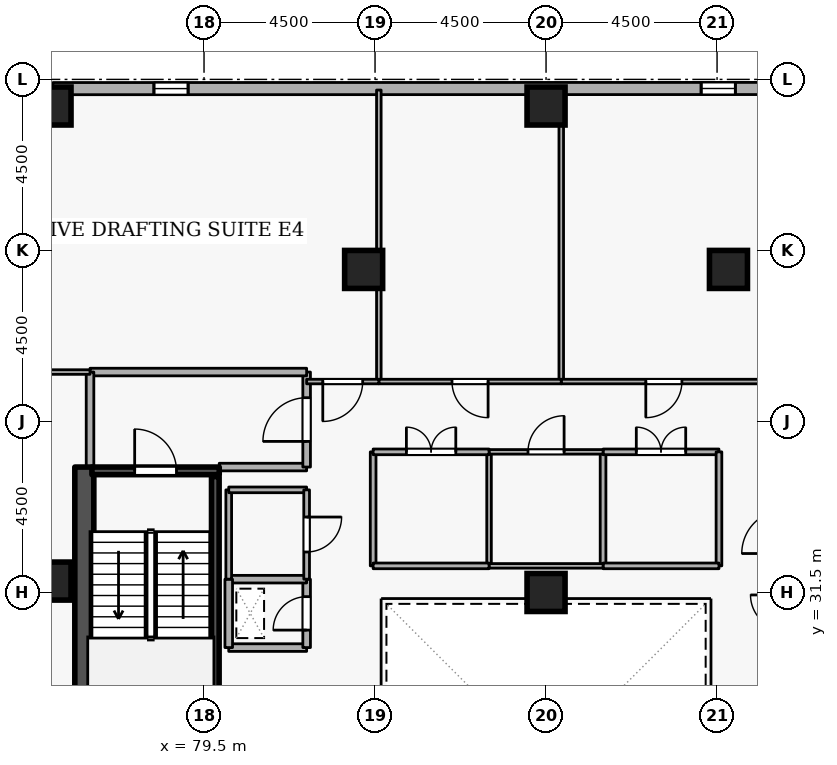
"""IFC4 building model, lengths in metres.
Left out: names, types, materials, properties, quantities, classifications, styles, units other than length and angle.
Written with IfcOpenShell. Run it as: python <this file> out.ifc"""

import sys

from ifc_helpers import new_model, si_unit, direction, frame, frame_2d, origin, origin_2d, place, context, subcontext, project, spatial, rectangle, extrude, element, fill, save


model = new_model("IFC4")
c1 = context("Model", 3, precision=1e-05, world=origin(), true_north=direction((0.0, 1.0)))
c2 = subcontext(c1, "Body", "Model", "MODEL_VIEW")
j1 = project(units=[si_unit("LENGTHUNIT", "METRE"), si_unit("PLANEANGLEUNIT", "RADIAN")], contexts=[c1])
p1 = place(None, origin())
s1 = spatial("IfcSite", under=j1, at=p1, CompositionType="ELEMENT")
p2 = place(p1, origin())
s2 = spatial("IfcBuilding", under=s1, at=p2, CompositionType="ELEMENT")
p3 = place(p2, frame((0.0, 0.0, 247.5)))
s3 = spatial("IfcBuildingStorey", under=s2, at=p3, CompositionType="ELEMENT", Elevation=247.5)
p4 = place(p3, frame((76.35, 19.2, 0.0), z_axis=(0.0, 0.0, 1.0), x_axis=(0.0, 1.0, 0.0)))
e1 = element("IfcWall", 1, at=p4, inside=s3, PredefinedType="SHEAR", context=c2, shape_type="SweptSolid", body=[
    extrude(rectangle(XDim=15.6, YDim=0.5, at=frame_2d((7.8, 0.0))), origin(), (0.0, 0.0, 1.0), 3.6),
])
for number, where, z_axis, x_axis in (
    (2, (88.5, 44.3, 0.0), (0.0, 0.0, 1.0), (1.0, 0.0, 0.0)),
    (3, (75.5, 44.3, 0.0), (0.0, 0.0, 1.0), (1.0, 0.0, 0.0)),
    (4, (93.3, 40.0, 0.0), (0.0, 0.0, 1.0), (1.0, 0.0, 0.0)),
    (5, (83.7, 40.0, 0.0), (0.0, 0.0, 1.0), (1.0, 0.0, 0.0)),
    (6, (75.5, 31.8, 0.0), (0.0, 0.0, 1.0), (1.0, 0.0, 0.0)),
    (7, (88.5, 31.5, 0.0), (0.0, 0.0, 1.0), (1.0, 0.0, 0.0)),
):
    element("IfcColumn", number, at=place(p3, frame(where, z_axis=z_axis, x_axis=x_axis)), inside=s3, PredefinedType="COLUMN", context=c2, shape_type="SweptSolid", body=[
        extrude(rectangle(XDim=1.0, YDim=1.0, at=origin_2d()), origin(), (0.0, 0.0, 1.0), 3.6),
    ])
p5 = place(p3, frame((109.681, 44.765, 0.0), z_axis=(0.0, 0.0, 1.0), x_axis=(-0.99999997701, -0.000214431216, 0.0)))
e8 = element("IfcWall", 8, at=p5, inside=s3, PredefinedType="STANDARD", context=c2, shape_type="SweptSolid", body=[
    extrude(rectangle(XDim=34.156, YDim=0.32, at=frame_2d((17.078, 0.0))), origin(), (0.0, 0.0, 1.0), 2.7),
])
p6 = place(p5, frame((1.8, 0.0, 0.72)))
e9 = element("IfcOpeningElement", 9, at=p6, cuts=e8, PredefinedType="OPENING", context=c2, shape_type="SweptSolid", body=[
    extrude(rectangle(XDim=0.9, YDim=1.75, at=frame_2d((0.45, 0.875))), frame((0.0, 0.17, 0.0), z_axis=(0.0, -1.0, 0.0), x_axis=(1.0, 0.0, 0.0)), (0.0, 0.0, 1.0), 0.34),
])
p7 = place(p5, frame((11.4, 0.0, 0.72)))
e10 = element("IfcOpeningElement", 10, at=p7, cuts=e8, PredefinedType="OPENING", context=c2, shape_type="SweptSolid", body=[
    extrude(rectangle(XDim=0.9, YDim=1.75, at=frame_2d((0.45, 0.875))), frame((0.0, 0.17, 0.0), z_axis=(0.0, -1.0, 0.0), x_axis=(1.0, 0.0, 0.0)), (0.0, 0.0, 1.0), 0.34),
])
p8 = place(p5, frame((16.2, 0.0, 0.72)))
e11 = element("IfcOpeningElement", 11, at=p8, cuts=e8, PredefinedType="OPENING", context=c2, shape_type="SweptSolid", body=[
    extrude(rectangle(XDim=0.9, YDim=1.75, at=frame_2d((0.45, 0.875))), frame((0.0, 0.17, 0.0), z_axis=(0.0, -1.0, 0.0), x_axis=(1.0, 0.0, 0.0)), (0.0, 0.0, 1.0), 0.34),
])
p9 = place(p5, frame((30.6, 0.0, 0.72)))
e12 = element("IfcOpeningElement", 12, at=p9, cuts=e8, PredefinedType="OPENING", context=c2, shape_type="SweptSolid", body=[
    extrude(rectangle(XDim=0.9, YDim=1.75, at=frame_2d((0.45, 0.875))), frame((0.0, 0.17, 0.0), z_axis=(0.0, -1.0, 0.0), x_axis=(1.0, 0.0, 0.0)), (0.0, 0.0, 1.0), 0.34),
])
p10 = place(p3, frame((76.55, 34.7, 0.0), z_axis=(0.0, 0.0, 1.0), x_axis=(1.0, 0.0, 0.0)))
e13 = element("IfcWall", 13, at=p10, inside=s3, PredefinedType="SHEAR", context=c2, shape_type="SweptSolid", body=[
    extrude(rectangle(XDim=3.35, YDim=0.2, at=frame_2d((1.675, 0.0))), origin(), (0.0, 0.0, 1.0), 3.6),
])
p11 = place(p10, frame((1.125, 0.0, 0.0)))
e14 = element("IfcOpeningElement", 14, at=p11, cuts=e13, PredefinedType="OPENING", context=c2, shape_type="SweptSolid", body=[
    extrude(rectangle(XDim=1.1, YDim=2.1, at=frame_2d((0.55, 1.05))), frame((0.0, 0.11, 0.0), z_axis=(0.0, -1.0, 0.0), x_axis=(1.0, 0.0, 0.0)), (0.0, 0.0, 1.0), 0.22),
])
p12 = place(p3, frame((79.797, 27.45, 0.0), z_axis=(0.0, 0.0, 1.0), x_axis=(0.0, 1.0, 0.0)))
e15 = element("IfcWall", 15, at=p12, inside=s3, PredefinedType="SHEAR", context=c2, shape_type="SweptSolid", body=[
    extrude(rectangle(XDim=7.1, YDim=0.2, at=frame_2d((3.55, 0.0))), origin(), (0.0, 0.0, 1.0), 3.6),
])
p13 = place(p3, frame((79.9, 34.8, 0.0), z_axis=(0.0, 0.0, 1.0), x_axis=(1.0, 0.0, 0.0)))
e16 = element("IfcWall", 16, at=p13, inside=s3, PredefinedType="STANDARD", context=c2, shape_type="SweptSolid", body=[
    extrude(rectangle(XDim=2.3, YDim=0.2, at=frame_2d((1.15, 0.0))), origin(), (0.0, 0.0, 1.0), 2.545),
])
p14 = place(p3, frame((82.2, 34.8, 0.0), z_axis=(0.0, 0.0, 1.0), x_axis=(0.0, 1.0, 0.0)))
e17 = element("IfcWall", 17, at=p14, inside=s3, PredefinedType="STANDARD", context=c2, shape_type="SweptSolid", body=[
    extrude(rectangle(XDim=2.5, YDim=0.2, at=frame_2d((1.25, 0.0))), origin(), (0.0, 0.0, 1.0), 3.34),
])
p15 = place(p14, frame((0.675, 0.0, 0.0)))
e18 = element("IfcOpeningElement", 18, at=p15, cuts=e17, PredefinedType="OPENING", context=c2, shape_type="SweptSolid", body=[
    extrude(rectangle(XDim=1.15, YDim=2.1, at=frame_2d((0.575, 1.05))), frame((0.0, 0.11, 0.0), z_axis=(0.0, -1.0, 0.0), x_axis=(1.0, 0.0, 0.0)), (0.0, 0.0, 1.0), 0.22),
])
p16 = place(p3, frame((82.2, 37.3, 0.0), z_axis=(0.0, 0.0, 1.0), x_axis=(-1.0, 0.0, 0.0)))
e19 = element("IfcWall", 19, at=p16, inside=s3, PredefinedType="STANDARD", context=c2, shape_type="SweptSolid", body=[
    extrude(rectangle(XDim=5.7, YDim=0.2, at=frame_2d((2.85, 0.0))), origin(), (0.0, 0.0, 1.0), 3.34),
])
p17 = place(p3, frame((76.5, 37.3, 0.0), z_axis=(0.0, 0.0, 1.0), x_axis=(0.0, -1.0, 0.0)))
e20 = element("IfcWall", 20, at=p17, inside=s3, PredefinedType="STANDARD", context=c2, shape_type="SweptSolid", body=[
    extrude(rectangle(XDim=2.5, YDim=0.2, at=frame_2d((1.25, 0.0))), origin(), (0.0, 0.0, 1.0), 3.34),
])
p18 = place(p3, frame((80.15, 30.05, 0.0), z_axis=(0.0, 0.0, 1.0), x_axis=(1.0, 0.0, 0.0)))
e21 = element("IfcWall", 21, at=p18, inside=s3, PredefinedType="STANDARD", context=c2, shape_type="SweptSolid", body=[
    extrude(rectangle(XDim=2.05, YDim=0.2, at=frame_2d((1.025, 0.0))), origin(), (0.0, 0.0, 1.0), 3.34),
])
p19 = place(p3, frame((82.2, 30.05, 0.0), z_axis=(0.0, 0.0, 1.0), x_axis=(0.0, 1.0, 0.0)))
e22 = element("IfcWall", 22, at=p19, inside=s3, PredefinedType="STANDARD", context=c2, shape_type="SweptSolid", body=[
    extrude(rectangle(XDim=1.8, YDim=0.2, at=frame_2d((0.9, 0.0))), origin(), (0.0, 0.0, 1.0), 3.34),
])
p20 = place(p19, frame((0.46, 0.0, 0.0)))
e23 = element("IfcOpeningElement", 23, at=p20, cuts=e22, PredefinedType="OPENING", context=c2, shape_type="SweptSolid", body=[
    extrude(rectangle(XDim=0.88, YDim=2.04, at=frame_2d((0.44, 1.02))), frame((0.0, 0.11, 0.0), z_axis=(0.0, -1.0, 0.0), x_axis=(1.0, 0.0, 0.0)), (0.0, 0.0, 1.0), 0.22),
])
p21 = place(p3, frame((82.2, 31.85, 0.0), z_axis=(0.0, 0.0, 1.0), x_axis=(-1.0, 0.0, 0.0)))
e24 = element("IfcWall", 24, at=p21, inside=s3, PredefinedType="STANDARD", context=c2, shape_type="SweptSolid", body=[
    extrude(rectangle(XDim=2.05, YDim=0.2, at=frame_2d((1.025, 0.0))), origin(), (0.0, 0.0, 1.0), 3.34),
])
p22 = place(p3, frame((80.15, 31.85, 0.0), z_axis=(0.0, 0.0, 1.0), x_axis=(0.0, -1.0, 0.0)))
e25 = element("IfcWall", 25, at=p22, inside=s3, PredefinedType="STANDARD", context=c2, shape_type="SweptSolid", body=[
    extrude(rectangle(XDim=1.8, YDim=0.2, at=frame_2d((0.9, 0.0))), origin(), (0.0, 0.0, 1.0), 3.34),
])
p23 = place(p3, frame((80.15, 31.85, 0.0), z_axis=(0.0, 0.0, 1.0), x_axis=(0.0, 1.0, 0.0)))
e26 = element("IfcWall", 26, at=p23, inside=s3, PredefinedType="PARTITIONING", context=c2, shape_type="SweptSolid", body=[
    extrude(rectangle(XDim=2.35, YDim=0.15, at=frame_2d((1.175, 0.0))), origin(), (0.0, 0.0, 1.0), 3.34),
])
p24 = place(p3, frame((80.15, 34.2, 0.0), z_axis=(0.0, 0.0, 1.0), x_axis=(1.0, 0.0, 0.0)))
e27 = element("IfcWall", 27, at=p24, inside=s3, PredefinedType="PARTITIONING", context=c2, shape_type="SweptSolid", body=[
    extrude(rectangle(XDim=2.05, YDim=0.15, at=frame_2d((1.025, 0.0))), origin(), (0.0, 0.0, 1.0), 2.545),
])
p25 = place(p3, frame((82.2, 34.2, 0.0), z_axis=(0.0, 0.0, 1.0), x_axis=(0.0, -1.0, 0.0)))
e28 = element("IfcWall", 28, at=p25, inside=s3, PredefinedType="PARTITIONING", context=c2, shape_type="SweptSolid", body=[
    extrude(rectangle(XDim=2.35, YDim=0.15, at=frame_2d((1.175, 0.0))), origin(), (0.0, 0.0, 1.0), 3.34),
])
p26 = place(p25, frame((0.715, 0.0, 0.0)))
e29 = element("IfcOpeningElement", 29, at=p26, cuts=e28, PredefinedType="OPENING", context=c2, shape_type="SweptSolid", body=[
    extrude(rectangle(XDim=0.92, YDim=2.08, at=frame_2d((0.46, 1.04))), frame((0.0, 0.085, 0.0), z_axis=(0.0, -1.0, 0.0), x_axis=(1.0, 0.0, 0.0)), (0.0, 0.0, 1.0), 0.17),
])
p27 = place(p3, frame((88.9, 37.05, 0.0), z_axis=(0.0, 0.0, 1.0), x_axis=(0.0, 1.0, 0.0)))
e30 = element("IfcWall", 30, at=p27, inside=s3, PredefinedType="PARTITIONING", context=c2, shape_type="SweptSolid", body=[
    extrude(rectangle(XDim=7.25, YDim=0.12, at=frame_2d((3.625, 0.0))), origin(), (0.0, 0.0, 1.0), 3.34),
])
p28 = place(p3, frame((94.3, 37.05, 0.0), z_axis=(0.0, 0.0, 1.0), x_axis=(-1.0, 0.0, 0.0)))
e31 = element("IfcWall", 31, at=p28, inside=s3, PredefinedType="PARTITIONING", context=c2, shape_type="SweptSolid", body=[
    extrude(rectangle(XDim=5.4, YDim=0.12, at=frame_2d((2.7, 0.0))), origin(), (0.0, 0.0, 1.0), 3.34),
])
p29 = place(p28, frame((2.225, 0.0, 0.0)))
e32 = element("IfcOpeningElement", 32, at=p29, cuts=e31, PredefinedType="OPENING", context=c2, shape_type="SweptSolid", body=[
    extrude(rectangle(XDim=0.95, YDim=2.1, at=frame_2d((0.475, 1.05))), frame((0.0, 0.07, 0.0), z_axis=(0.0, -1.0, 0.0), x_axis=(1.0, 0.0, 0.0)), (0.0, 0.0, 1.0), 0.14),
])
p30 = place(p3, frame((84.1, 37.05, 0.0), z_axis=(0.0, 0.0, 1.0), x_axis=(0.0, 1.0, 0.0)))
e33 = element("IfcWall", 33, at=p30, inside=s3, PredefinedType="PARTITIONING", context=c2, shape_type="SweptSolid", body=[
    extrude(rectangle(XDim=7.67, YDim=0.12, at=frame_2d((3.835, 0.0))), origin(), (0.0, 0.0, 1.0), 3.34),
])
p31 = place(p3, frame((88.9, 37.05, 0.0), z_axis=(0.0, 0.0, 1.0), x_axis=(-1.0, 0.0, 0.0)))
e34 = element("IfcWall", 34, at=p31, inside=s3, PredefinedType="PARTITIONING", context=c2, shape_type="SweptSolid", body=[
    extrude(rectangle(XDim=4.8, YDim=0.12, at=frame_2d((2.4, 0.0))), origin(), (0.0, 0.0, 1.0), 3.34),
])
p32 = place(p31, frame((1.925, 0.0, 0.0)))
e35 = element("IfcOpeningElement", 35, at=p32, cuts=e34, PredefinedType="OPENING", context=c2, shape_type="SweptSolid", body=[
    extrude(rectangle(XDim=0.95, YDim=2.1, at=frame_2d((0.475, 1.05))), frame((0.0, 0.07, 0.0), z_axis=(0.0, -1.0, 0.0), x_axis=(1.0, 0.0, 0.0)), (0.0, 0.0, 1.0), 0.14),
])
p33 = place(p3, frame((76.5, 37.3, 0.0), z_axis=(0.0, 0.0, 1.0), x_axis=(-1.0, 0.0, 0.0)))
e36 = element("IfcWall", 36, at=p33, inside=s3, PredefinedType="PARTITIONING", context=c2, shape_type="SweptSolid", body=[
    extrude(rectangle(XDim=5.72, YDim=0.12, at=frame_2d((2.86, 0.0))), origin(), (0.0, 0.0, 1.0), 3.34),
])
p34 = place(p3, frame((84.1, 37.05, 0.0), z_axis=(0.0, 0.0, 1.0), x_axis=(-1.0, 0.0, 0.0)))
e37 = element("IfcWall", 37, at=p34, inside=s3, PredefinedType="PARTITIONING", context=c2, shape_type="SweptSolid", body=[
    extrude(rectangle(XDim=1.9, YDim=0.12, at=frame_2d((0.95, 0.0))), origin(), (0.0, 0.0, 1.0), 3.34),
])
p35 = place(p34, frame((0.425, 0.0, 0.0)))
e38 = element("IfcOpeningElement", 38, at=p35, cuts=e37, PredefinedType="OPENING", context=c2, shape_type="SweptSolid", body=[
    extrude(rectangle(XDim=1.05, YDim=2.1, at=frame_2d((0.525, 1.05))), frame((0.0, 0.07, 0.0), z_axis=(0.0, -1.0, 0.0), x_axis=(1.0, 0.0, 0.0)), (0.0, 0.0, 1.0), 0.14),
])
p36 = place(p3, frame((90.0, 32.2, 0.0), z_axis=(0.0, 0.0, 1.0), x_axis=(0.0, 1.0, 0.0)))
e39 = element("IfcWall", 39, at=p36, inside=s3, PredefinedType="PARTITIONING", context=c2, shape_type="SweptSolid", body=[
    extrude(rectangle(XDim=3.0, YDim=0.15, at=frame_2d((1.5, 0.0))), origin(), (0.0, 0.0, 1.0), 3.34),
])
p37 = place(p3, frame((90.0, 35.2, 0.0), z_axis=(0.0, 0.0, 1.0), x_axis=(1.0, 0.0, 0.0)))
e40 = element("IfcWall", 40, at=p37, inside=s3, PredefinedType="PARTITIONING", context=c2, shape_type="SweptSolid", body=[
    extrude(rectangle(XDim=3.05, YDim=0.15, at=frame_2d((1.525, 0.0))), origin(), (0.0, 0.0, 1.0), 3.34),
])
p38 = place(p37, frame((0.875, 0.0, 0.0)))
e41 = element("IfcOpeningElement", 41, at=p38, cuts=e40, PredefinedType="OPENING", context=c2, shape_type="SweptSolid", body=[
    extrude(rectangle(XDim=1.3, YDim=2.12, at=frame_2d((0.65, 1.06))), frame((0.0, 0.085, 0.0), z_axis=(0.0, -1.0, 0.0), x_axis=(1.0, 0.0, 0.0)), (0.0, 0.0, 1.0), 0.17),
])
p39 = place(p3, frame((93.05, 35.2, 0.0), z_axis=(0.0, 0.0, 1.0), x_axis=(0.0, -1.0, 0.0)))
e42 = element("IfcWall", 42, at=p39, inside=s3, PredefinedType="PARTITIONING", context=c2, shape_type="SweptSolid", body=[
    extrude(rectangle(XDim=3.0, YDim=0.15, at=frame_2d((1.5, 0.0))), origin(), (0.0, 0.0, 1.0), 3.34),
])
p40 = place(p3, frame((93.05, 32.2, 0.0), z_axis=(0.0, 0.0, 1.0), x_axis=(-1.0, 0.0, 0.0)))
e43 = element("IfcWall", 43, at=p40, inside=s3, PredefinedType="PARTITIONING", context=c2, shape_type="SweptSolid", body=[
    extrude(rectangle(XDim=3.05, YDim=0.15, at=frame_2d((1.525, 0.0))), origin(), (0.0, 0.0, 1.0), 3.34),
])
p41 = place(p3, frame((87.0, 32.2, 0.0), z_axis=(0.0, 0.0, 1.0), x_axis=(0.0, 1.0, 0.0)))
e44 = element("IfcWall", 44, at=p41, inside=s3, PredefinedType="PARTITIONING", context=c2, shape_type="SweptSolid", body=[
    extrude(rectangle(XDim=3.0, YDim=0.12, at=frame_2d((1.5, 0.0))), origin(), (0.0, 0.0, 1.0), 3.34),
])
p42 = place(p3, frame((87.0, 35.2, 0.0), z_axis=(0.0, 0.0, 1.0), x_axis=(1.0, 0.0, 0.0)))
e45 = element("IfcWall", 45, at=p42, inside=s3, PredefinedType="PARTITIONING", context=c2, shape_type="SweptSolid", body=[
    extrude(rectangle(XDim=3.0, YDim=0.12, at=frame_2d((1.5, 0.0))), origin(), (0.0, 0.0, 1.0), 3.34),
])
p43 = place(p42, frame((1.025, 0.0, 0.0)))
e46 = element("IfcOpeningElement", 46, at=p43, cuts=e45, PredefinedType="OPENING", context=c2, shape_type="SweptSolid", body=[
    extrude(rectangle(XDim=0.95, YDim=2.1, at=frame_2d((0.475, 1.05))), frame((0.0, 0.07, 0.0), z_axis=(0.0, -1.0, 0.0), x_axis=(1.0, 0.0, 0.0)), (0.0, 0.0, 1.0), 0.14),
])
p44 = place(p3, frame((90.0, 32.2, 0.0), z_axis=(0.0, 0.0, 1.0), x_axis=(-1.0, 0.0, 0.0)))
e47 = element("IfcWall", 47, at=p44, inside=s3, PredefinedType="PARTITIONING", context=c2, shape_type="SweptSolid", body=[
    extrude(rectangle(XDim=3.0, YDim=0.12, at=frame_2d((1.5, 0.0))), origin(), (0.0, 0.0, 1.0), 3.34),
])
p45 = place(p3, frame((83.95, 32.2, 0.0), z_axis=(0.0, 0.0, 1.0), x_axis=(0.0, 1.0, 0.0)))
e48 = element("IfcWall", 48, at=p45, inside=s3, PredefinedType="PARTITIONING", context=c2, shape_type="SweptSolid", body=[
    extrude(rectangle(XDim=3.0, YDim=0.15, at=frame_2d((1.5, 0.0))), origin(), (0.0, 0.0, 1.0), 3.34),
])
p46 = place(p3, frame((83.95, 35.2, 0.0), z_axis=(0.0, 0.0, 1.0), x_axis=(1.0, 0.0, 0.0)))
e49 = element("IfcWall", 49, at=p46, inside=s3, PredefinedType="PARTITIONING", context=c2, shape_type="SweptSolid", body=[
    extrude(rectangle(XDim=3.05, YDim=0.15, at=frame_2d((1.525, 0.0))), origin(), (0.0, 0.0, 1.0), 3.34),
])
p47 = place(p46, frame((0.875, 0.0, 0.0)))
e50 = element("IfcOpeningElement", 50, at=p47, cuts=e49, PredefinedType="OPENING", context=c2, shape_type="SweptSolid", body=[
    extrude(rectangle(XDim=1.3, YDim=2.12, at=frame_2d((0.65, 1.06))), frame((0.0, 0.085, 0.0), z_axis=(0.0, -1.0, 0.0), x_axis=(1.0, 0.0, 0.0)), (0.0, 0.0, 1.0), 0.17),
])
p48 = place(p3, frame((87.0, 32.2, 0.0), z_axis=(0.0, 0.0, 1.0), x_axis=(-1.0, 0.0, 0.0)))
e51 = element("IfcWall", 51, at=p48, inside=s3, PredefinedType="PARTITIONING", context=c2, shape_type="SweptSolid", body=[
    extrude(rectangle(XDim=3.05, YDim=0.15, at=frame_2d((1.525, 0.0))), origin(), (0.0, 0.0, 1.0), 3.34),
])
p49 = place(p8, origin())
e52 = element("IfcWindow", 52, at=p49, inside=s3, PartitioningType="SINGLE_PANEL", PredefinedType="WINDOW", context=c2, shape_type="SweptSolid", body=[
    extrude(rectangle(XDim=0.9, YDim=1.75, at=frame_2d((0.45, 0.875))), frame((0.0, 0.03, 0.0), z_axis=(0.0, -1.0, 0.0), x_axis=(1.0, 0.0, 0.0)), (0.0, 0.0, 1.0), 0.06),
])
fill(e11, e52)
p50 = place(p9, origin())
e53 = element("IfcWindow", 53, at=p50, inside=s3, PartitioningType="SINGLE_PANEL", PredefinedType="WINDOW", context=c2, shape_type="SweptSolid", body=[
    extrude(rectangle(XDim=0.9, YDim=1.75, at=frame_2d((0.45, 0.875))), frame((0.0, 0.03, 0.0), z_axis=(0.0, -1.0, 0.0), x_axis=(1.0, 0.0, 0.0)), (0.0, 0.0, 1.0), 0.06),
])
fill(e12, e53)
p51 = place(p11, origin())
e54 = element("IfcDoor", 54, at=p51, inside=s3, OperationType="SINGLE_SWING_LEFT", PredefinedType="DOOR", context=c2, shape_type="SweptSolid", body=[
    extrude(rectangle(XDim=1.1, YDim=2.1, at=frame_2d((0.55, 1.05))), frame((0.0, 0.025, 0.0), z_axis=(0.0, -1.0, 0.0), x_axis=(1.0, 0.0, 0.0)), (0.0, 0.0, 1.0), 0.05),
])
fill(e14, e54)
p52 = place(p15, origin())
e55 = element("IfcDoor", 55, at=p52, inside=s3, OperationType="SINGLE_SWING_LEFT", PredefinedType="DOOR", context=c2, shape_type="SweptSolid", body=[
    extrude(rectangle(XDim=1.15, YDim=2.1, at=frame_2d((0.575, 1.05))), frame((0.0, 0.025, 0.0), z_axis=(0.0, -1.0, 0.0), x_axis=(1.0, 0.0, 0.0)), (0.0, 0.0, 1.0), 0.05),
])
fill(e18, e55)
p53 = place(p20, origin())
e56 = element("IfcDoor", 56, at=p53, inside=s3, OperationType="SINGLE_SWING_LEFT", PredefinedType="DOOR", context=c2, shape_type="SweptSolid", body=[
    extrude(rectangle(XDim=0.88, YDim=2.04, at=frame_2d((0.44, 1.02))), frame((0.0, 0.025, 0.0), z_axis=(0.0, -1.0, 0.0), x_axis=(1.0, 0.0, 0.0)), (0.0, 0.0, 1.0), 0.05),
])
fill(e23, e56)
p54 = place(p26, origin())
e57 = element("IfcDoor", 57, at=p54, inside=s3, OperationType="SINGLE_SWING_LEFT", PredefinedType="DOOR", context=c2, shape_type="SweptSolid", body=[
    extrude(rectangle(XDim=0.92, YDim=2.08, at=frame_2d((0.46, 1.04))), frame((0.0, 0.025, 0.0), z_axis=(0.0, -1.0, 0.0), x_axis=(1.0, 0.0, 0.0)), (0.0, 0.0, 1.0), 0.05),
])
fill(e29, e57)
p55 = place(p29, origin())
e58 = element("IfcDoor", 58, at=p55, inside=s3, OperationType="SINGLE_SWING_RIGHT", PredefinedType="DOOR", context=c2, shape_type="SweptSolid", body=[
    extrude(rectangle(XDim=0.95, YDim=2.1, at=frame_2d((0.475, 1.05))), frame((0.0, 0.025, 0.0), z_axis=(0.0, -1.0, 0.0), x_axis=(1.0, 0.0, 0.0)), (0.0, 0.0, 1.0), 0.05),
])
fill(e32, e58)
p56 = place(p32, origin())
e59 = element("IfcDoor", 59, at=p56, inside=s3, OperationType="SINGLE_SWING_LEFT", PredefinedType="DOOR", context=c2, shape_type="SweptSolid", body=[
    extrude(rectangle(XDim=0.95, YDim=2.1, at=frame_2d((0.475, 1.05))), frame((0.0, 0.025, 0.0), z_axis=(0.0, -1.0, 0.0), x_axis=(1.0, 0.0, 0.0)), (0.0, 0.0, 1.0), 0.05),
])
fill(e35, e59)
p57 = place(p35, origin())
e60 = element("IfcDoor", 60, at=p57, inside=s3, OperationType="SINGLE_SWING_RIGHT", PredefinedType="DOOR", context=c2, shape_type="SweptSolid", body=[
    extrude(rectangle(XDim=1.05, YDim=2.1, at=frame_2d((0.525, 1.05))), frame((0.0, 0.025, 0.0), z_axis=(0.0, -1.0, 0.0), x_axis=(1.0, 0.0, 0.0)), (0.0, 0.0, 1.0), 0.05),
])
fill(e38, e60)
p58 = place(p38, origin())
e61 = element("IfcDoor", 61, at=p58, inside=s3, OperationType="DOUBLE_DOOR_SINGLE_SWING", PredefinedType="DOOR", context=c2, shape_type="SweptSolid", body=[
    extrude(rectangle(XDim=1.3, YDim=2.12, at=frame_2d((0.65, 1.06))), frame((0.0, 0.025, 0.0), z_axis=(0.0, -1.0, 0.0), x_axis=(1.0, 0.0, 0.0)), (0.0, 0.0, 1.0), 0.05),
])
fill(e41, e61)
p59 = place(p43, origin())
e62 = element("IfcDoor", 62, at=p59, inside=s3, OperationType="SINGLE_SWING_RIGHT", PredefinedType="DOOR", context=c2, shape_type="SweptSolid", body=[
    extrude(rectangle(XDim=0.95, YDim=2.1, at=frame_2d((0.475, 1.05))), frame((0.0, 0.025, 0.0), z_axis=(0.0, -1.0, 0.0), x_axis=(1.0, 0.0, 0.0)), (0.0, 0.0, 1.0), 0.05),
])
fill(e46, e62)
p60 = place(p47, origin())
e63 = element("IfcDoor", 63, at=p60, inside=s3, OperationType="DOUBLE_DOOR_SINGLE_SWING", PredefinedType="DOOR", context=c2, shape_type="SweptSolid", body=[
    extrude(rectangle(XDim=1.3, YDim=2.12, at=frame_2d((0.65, 1.06))), frame((0.0, 0.025, 0.0), z_axis=(0.0, -1.0, 0.0), x_axis=(1.0, 0.0, 0.0)), (0.0, 0.0, 1.0), 0.05),
])
fill(e50, e63)
save(model, sys.argv[1])
